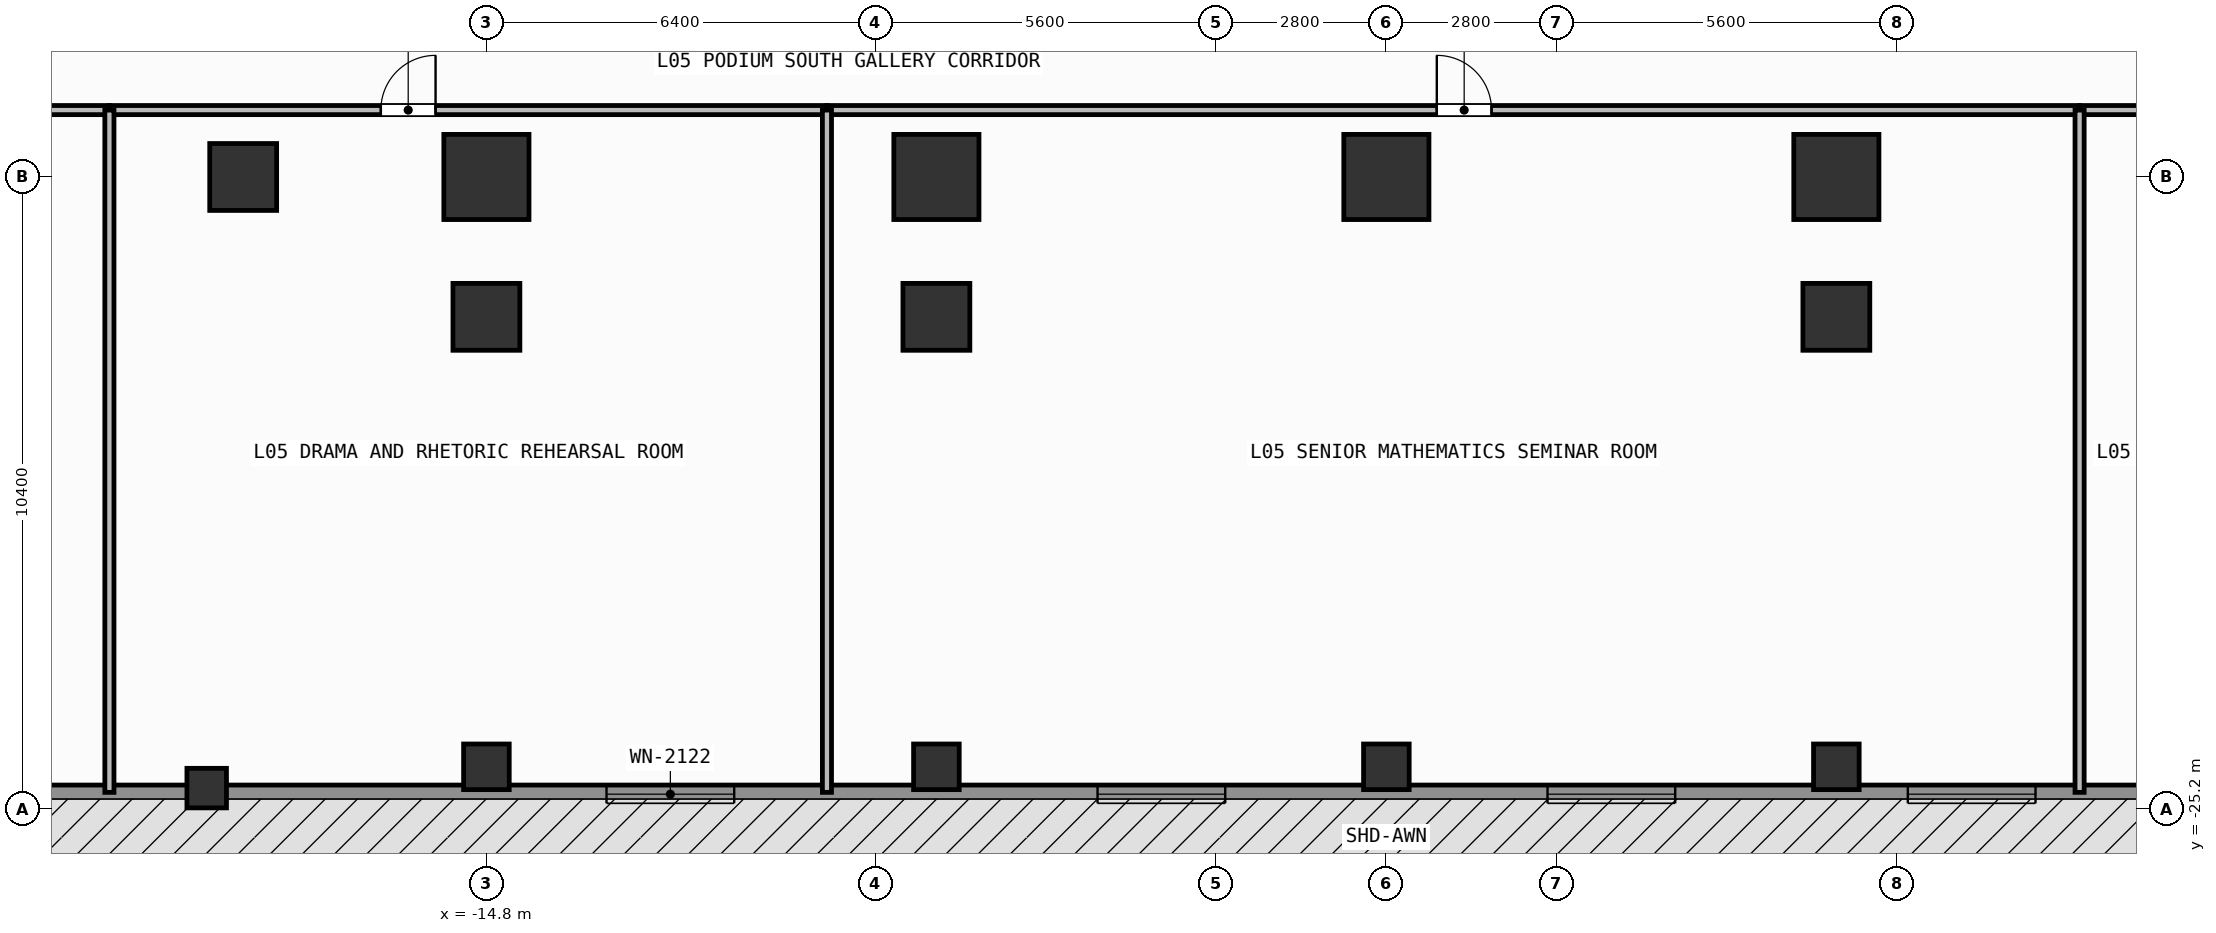
"""IFC4 building model, lengths in metres.
Left out: names, types, materials, properties, quantities, classifications, styles, units other than length and angle.
Written with IfcOpenShell. Run it as: python <this file> out.ifc"""

import sys

from ifc_helpers import new_model, si_unit, direction, frame, frame_2d, origin, origin_2d, place, context, subcontext, project, spatial, rectangle, extrude, element, fill, save


model = new_model("IFC4")
c1 = context("Model", 3, precision=1e-05, world=origin(), true_north=direction((0.0, 1.0)))
c2 = subcontext(c1, "Body", "Model", "MODEL_VIEW")
j1 = project(units=[si_unit("LENGTHUNIT", "METRE"), si_unit("PLANEANGLEUNIT", "RADIAN")], contexts=[c1])
p1 = place(None, origin())
s1 = spatial("IfcSite", under=j1, at=p1, CompositionType="ELEMENT")
p2 = place(p1, origin())
s2 = spatial("IfcBuilding", under=s1, at=p2, CompositionType="ELEMENT")
p3 = place(p2, frame((0.0, 0.0, 17.4)))
s3 = spatial("IfcBuildingStorey", under=s2, at=p3, CompositionType="ELEMENT", Elevation=17.4)
for number, where, z_axis, x_axis in (
    (1, (-14.8, -14.8, 0.0), (0.0, 0.0, 1.0), (1.0, 0.0, 0.0)),
    (2, (-7.4, -14.8, 0.0), (0.0, 0.0, 1.0), (1.0, 0.0, 0.0)),
    (3, (0.0, -14.8, 0.0), (0.0, 0.0, 1.0), (1.0, 0.0, 0.0)),
    (4, (7.4, -14.8, 0.0), (0.0, 0.0, 1.0), (1.0, 0.0, 0.0)),
):
    element("IfcColumn", number, at=place(p3, frame(where, z_axis=z_axis, x_axis=x_axis)), inside=s3, PredefinedType="COLUMN", context=c2, shape_type="SweptSolid", body=[
        extrude(rectangle(XDim=1.4, YDim=1.4, at=origin_2d()), origin(), (0.0, 0.0, 1.0), 4.2),
    ])
for number, where, z_axis, x_axis in (
    (5, (-18.8, -14.8, 0.0), (0.0, 0.0, 1.0), (1.0, 0.0, 0.0)),
    (6, (-14.8, -17.1, 0.0), (0.0, 0.0, 1.0), (1.0, 0.0, 0.0)),
    (7, (-7.4, -17.1, 0.0), (0.0, 0.0, 1.0), (1.0, 0.0, 0.0)),
    (8, (7.4, -17.1, 0.0), (0.0, 0.0, 1.0), (1.0, 0.0, 0.0)),
):
    element("IfcColumn", number, at=place(p3, frame(where, z_axis=z_axis, x_axis=x_axis)), inside=s3, PredefinedType="COLUMN", context=c2, shape_type="SweptSolid", body=[
        extrude(rectangle(XDim=1.1, YDim=1.1, at=origin_2d()), origin(), (0.0, 0.0, 1.0), 4.2),
    ])
for number, where, z_axis, x_axis in (
    (9, (-14.8, -24.5, 0.0), (0.0, 0.0, 1.0), (1.0, 0.0, 0.0)),
    (10, (-7.4, -24.5, 0.0), (0.0, 0.0, 1.0), (1.0, 0.0, 0.0)),
    (11, (0.0, -24.5, 0.0), (0.0, 0.0, 1.0), (1.0, 0.0, 0.0)),
    (12, (7.4, -24.5, 0.0), (0.0, 0.0, 1.0), (1.0, 0.0, 0.0)),
):
    element("IfcColumn", number, at=place(p3, frame(where, z_axis=z_axis, x_axis=x_axis)), inside=s3, PredefinedType="COLUMN", context=c2, shape_type="SweptSolid", body=[
        extrude(rectangle(XDim=0.75, YDim=0.75, at=origin_2d()), origin(), (0.0, 0.0, 1.0), 4.2),
    ])
p4 = place(p3, frame((-19.4, -24.85, 0.0), z_axis=(0.0, 0.0, 1.0), x_axis=(1.0, 0.0, 0.0)))
e13 = element("IfcColumn", 13, at=p4, inside=s3, PredefinedType="PILASTER", context=c2, shape_type="SweptSolid", body=[
    extrude(rectangle(XDim=0.65, YDim=0.65, at=origin_2d()), origin(), (0.0, 0.0, 1.0), 4.2),
])
p5 = place(p3, frame((29.1, -24.95, 0.0), z_axis=(0.0, 0.0, 1.0), x_axis=(-1.0, 0.0, 0.0)))
e14 = element("IfcWall", 14, at=p5, inside=s3, PredefinedType="SOLIDWALL", context=c2, shape_type="SweptSolid", body=[
    extrude(rectangle(XDim=58.2, YDim=0.3, at=frame_2d((29.1, 0.0))), origin(), (0.0, 0.0, 1.0), 3.96),
])
p6 = place(p5, frame((39.825, 0.0, 0.85)))
e15 = element("IfcOpeningElement", 15, at=p6, cuts=e14, PredefinedType="OPENING", context=c2, shape_type="SweptSolid", body=[
    extrude(rectangle(XDim=2.1, YDim=2.2, at=frame_2d((1.05, 1.1))), frame((0.0, 0.16, 0.0), z_axis=(0.0, -1.0, 0.0), x_axis=(1.0, 0.0, 0.0)), (0.0, 0.0, 1.0), 0.32),
])
p7 = place(p5, frame((31.75, 0.0, 0.85)))
e16 = element("IfcOpeningElement", 16, at=p7, cuts=e14, PredefinedType="OPENING", context=c2, shape_type="SweptSolid", body=[
    extrude(rectangle(XDim=2.1, YDim=2.2, at=frame_2d((1.05, 1.1))), frame((0.0, 0.16, 0.0), z_axis=(0.0, -1.0, 0.0), x_axis=(1.0, 0.0, 0.0)), (0.0, 0.0, 1.0), 0.32),
])
p8 = place(p5, frame((24.35, 0.0, 0.85)))
e17 = element("IfcOpeningElement", 17, at=p8, cuts=e14, PredefinedType="OPENING", context=c2, shape_type="SweptSolid", body=[
    extrude(rectangle(XDim=2.1, YDim=2.2, at=frame_2d((1.05, 1.1))), frame((0.0, 0.16, 0.0), z_axis=(0.0, -1.0, 0.0), x_axis=(1.0, 0.0, 0.0)), (0.0, 0.0, 1.0), 0.32),
])
p9 = place(p5, frame((18.425, 0.0, 0.85)))
e18 = element("IfcOpeningElement", 18, at=p9, cuts=e14, PredefinedType="OPENING", context=c2, shape_type="SweptSolid", body=[
    extrude(rectangle(XDim=2.1, YDim=2.2, at=frame_2d((1.05, 1.1))), frame((0.0, 0.16, 0.0), z_axis=(0.0, -1.0, 0.0), x_axis=(1.0, 0.0, 0.0)), (0.0, 0.0, 1.0), 0.32),
])
p10 = place(p3, frame((-33.42, -13.7, 0.0), z_axis=(0.0, 0.0, 1.0), x_axis=(1.0, 0.0, 0.0)))
e19 = element("IfcWall", 19, at=p10, inside=s3, PredefinedType="PARTITIONING", context=c2, shape_type="SweptSolid", body=[
    extrude(rectangle(XDim=12.42, YDim=0.15, at=frame_2d((6.21, 0.0))), origin(), (0.0, 0.0, 1.0), 3.96),
])
p11 = place(p10, frame((5.849, 0.0, 0.0)))
e20 = element("IfcOpeningElement", 20, at=p11, cuts=e19, PredefinedType="OPENING", context=c2, shape_type="SweptSolid", body=[
    extrude(rectangle(XDim=0.9, YDim=2.1, at=frame_2d((0.45, 1.05))), frame((0.0, 0.085, 0.0), z_axis=(0.0, -1.0, 0.0), x_axis=(1.0, 0.0, 0.0)), (0.0, 0.0, 1.0), 0.17),
])
p12 = place(p3, frame((-21.0, -13.7, 0.0), z_axis=(0.0, 0.0, 1.0), x_axis=(1.0, 0.0, 0.0)))
e21 = element("IfcWall", 21, at=p12, inside=s3, PredefinedType="PARTITIONING", context=c2, shape_type="SweptSolid", body=[
    extrude(rectangle(XDim=11.8, YDim=0.15, at=frame_2d((5.9, 0.0))), origin(), (0.0, 0.0, 1.0), 3.96),
])
p13 = place(p12, frame((4.464, 0.0, 0.0)))
e22 = element("IfcOpeningElement", 22, at=p13, cuts=e21, PredefinedType="OPENING", context=c2, shape_type="SweptSolid", body=[
    extrude(rectangle(XDim=0.9, YDim=2.1, at=frame_2d((0.45, 1.05))), frame((0.0, 0.085, 0.0), z_axis=(0.0, -1.0, 0.0), x_axis=(1.0, 0.0, 0.0)), (0.0, 0.0, 1.0), 0.17),
])
p14 = place(p3, frame((-9.2, -13.7, 0.0), z_axis=(0.0, 0.0, 1.0), x_axis=(1.0, 0.0, 0.0)))
e23 = element("IfcWall", 23, at=p14, inside=s3, PredefinedType="PARTITIONING", context=c2, shape_type="SweptSolid", body=[
    extrude(rectangle(XDim=20.6, YDim=0.15, at=frame_2d((10.3, 0.0))), origin(), (0.0, 0.0, 1.0), 3.96),
])
p15 = place(p14, frame((10.029, 0.0, 0.0)))
e24 = element("IfcOpeningElement", 24, at=p15, cuts=e23, PredefinedType="OPENING", context=c2, shape_type="SweptSolid", body=[
    extrude(rectangle(XDim=0.9, YDim=2.1, at=frame_2d((0.45, 1.05))), frame((0.0, 0.085, 0.0), z_axis=(0.0, -1.0, 0.0), x_axis=(1.0, 0.0, 0.0)), (0.0, 0.0, 1.0), 0.17),
])
p16 = place(p3, frame((11.4, -13.7, 0.0), z_axis=(0.0, 0.0, 1.0), x_axis=(1.0, 0.0, 0.0)))
e25 = element("IfcWall", 25, at=p16, inside=s3, PredefinedType="PARTITIONING", context=c2, shape_type="SweptSolid", body=[
    extrude(rectangle(XDim=6.25, YDim=0.15, at=frame_2d((3.125, 0.0))), origin(), (0.0, 0.0, 1.0), 3.96),
])
p17 = place(p16, frame((1.597, 0.0, 0.0)))
e26 = element("IfcOpeningElement", 26, at=p17, cuts=e25, PredefinedType="OPENING", context=c2, shape_type="SweptSolid", body=[
    extrude(rectangle(XDim=0.9, YDim=2.1, at=frame_2d((0.45, 1.05))), frame((0.0, 0.085, 0.0), z_axis=(0.0, -1.0, 0.0), x_axis=(1.0, 0.0, 0.0)), (0.0, 0.0, 1.0), 0.17),
])
for number, where, z_axis, x_axis in (
    (27, (-21.0, -24.92, 0.0), (0.0, 0.0, 1.0), (0.0, 1.0, 0.0)),
    (28, (-9.2, -24.92, 0.0), (0.0, 0.0, 1.0), (0.0, 1.0, 0.0)),
    (29, (11.4, -24.92, 0.0), (0.0, 0.0, 1.0), (0.0, 1.0, 0.0)),
):
    element("IfcWall", number, at=place(p3, frame(where, z_axis=z_axis, x_axis=x_axis)), inside=s3, PredefinedType="PARTITIONING", context=c2, shape_type="SweptSolid", body=[
        extrude(rectangle(XDim=11.22, YDim=0.15, at=frame_2d((5.61, 0.0))), origin(), (0.0, 0.0, 1.0), 3.96),
    ])
p18 = place(p6, origin())
e30 = element("IfcWindow", 30, at=p18, inside=s3, PartitioningType="SINGLE_PANEL", PredefinedType="WINDOW", context=c2, shape_type="SweptSolid", body=[
    extrude(rectangle(XDim=2.1, YDim=2.2, at=frame_2d((1.05, 1.1))), frame((0.0, 0.03, 0.0), z_axis=(0.0, -1.0, 0.0), x_axis=(1.0, 0.0, 0.0)), (0.0, 0.0, 1.0), 0.06),
])
fill(e15, e30)
p19 = place(p7, origin())
e31 = element("IfcWindow", 31, at=p19, inside=s3, PartitioningType="SINGLE_PANEL", PredefinedType="WINDOW", context=c2, shape_type="SweptSolid", body=[
    extrude(rectangle(XDim=2.1, YDim=2.2, at=frame_2d((1.05, 1.1))), frame((0.0, 0.03, 0.0), z_axis=(0.0, -1.0, 0.0), x_axis=(1.0, 0.0, 0.0)), (0.0, 0.0, 1.0), 0.06),
])
fill(e16, e31)
p20 = place(p8, origin())
e32 = element("IfcWindow", 32, at=p20, inside=s3, PartitioningType="SINGLE_PANEL", PredefinedType="WINDOW", context=c2, shape_type="SweptSolid", body=[
    extrude(rectangle(XDim=2.1, YDim=2.2, at=frame_2d((1.05, 1.1))), frame((0.0, 0.03, 0.0), z_axis=(0.0, -1.0, 0.0), x_axis=(1.0, 0.0, 0.0)), (0.0, 0.0, 1.0), 0.06),
])
fill(e17, e32)
p21 = place(p9, origin())
e33 = element("IfcWindow", 33, at=p21, inside=s3, PartitioningType="SINGLE_PANEL", PredefinedType="WINDOW", context=c2, shape_type="SweptSolid", body=[
    extrude(rectangle(XDim=2.1, YDim=2.2, at=frame_2d((1.05, 1.1))), frame((0.0, 0.03, 0.0), z_axis=(0.0, -1.0, 0.0), x_axis=(1.0, 0.0, 0.0)), (0.0, 0.0, 1.0), 0.06),
])
fill(e18, e33)
p22 = place(p13, origin())
e34 = element("IfcDoor", 34, at=p22, inside=s3, OperationType="SINGLE_SWING_RIGHT", PredefinedType="DOOR", context=c2, shape_type="SweptSolid", body=[
    extrude(rectangle(XDim=0.9, YDim=2.1, at=frame_2d((0.45, 1.05))), frame((0.0, 0.025, 0.0), z_axis=(0.0, -1.0, 0.0), x_axis=(1.0, 0.0, 0.0)), (0.0, 0.0, 1.0), 0.05),
])
fill(e22, e34)
p23 = place(p15, origin())
e35 = element("IfcDoor", 35, at=p23, inside=s3, OperationType="SINGLE_SWING_LEFT", PredefinedType="DOOR", context=c2, shape_type="SweptSolid", body=[
    extrude(rectangle(XDim=0.9, YDim=2.1, at=frame_2d((0.45, 1.05))), frame((0.0, 0.025, 0.0), z_axis=(0.0, -1.0, 0.0), x_axis=(1.0, 0.0, 0.0)), (0.0, 0.0, 1.0), 0.05),
])
fill(e24, e35)
save(model, sys.argv[1])
